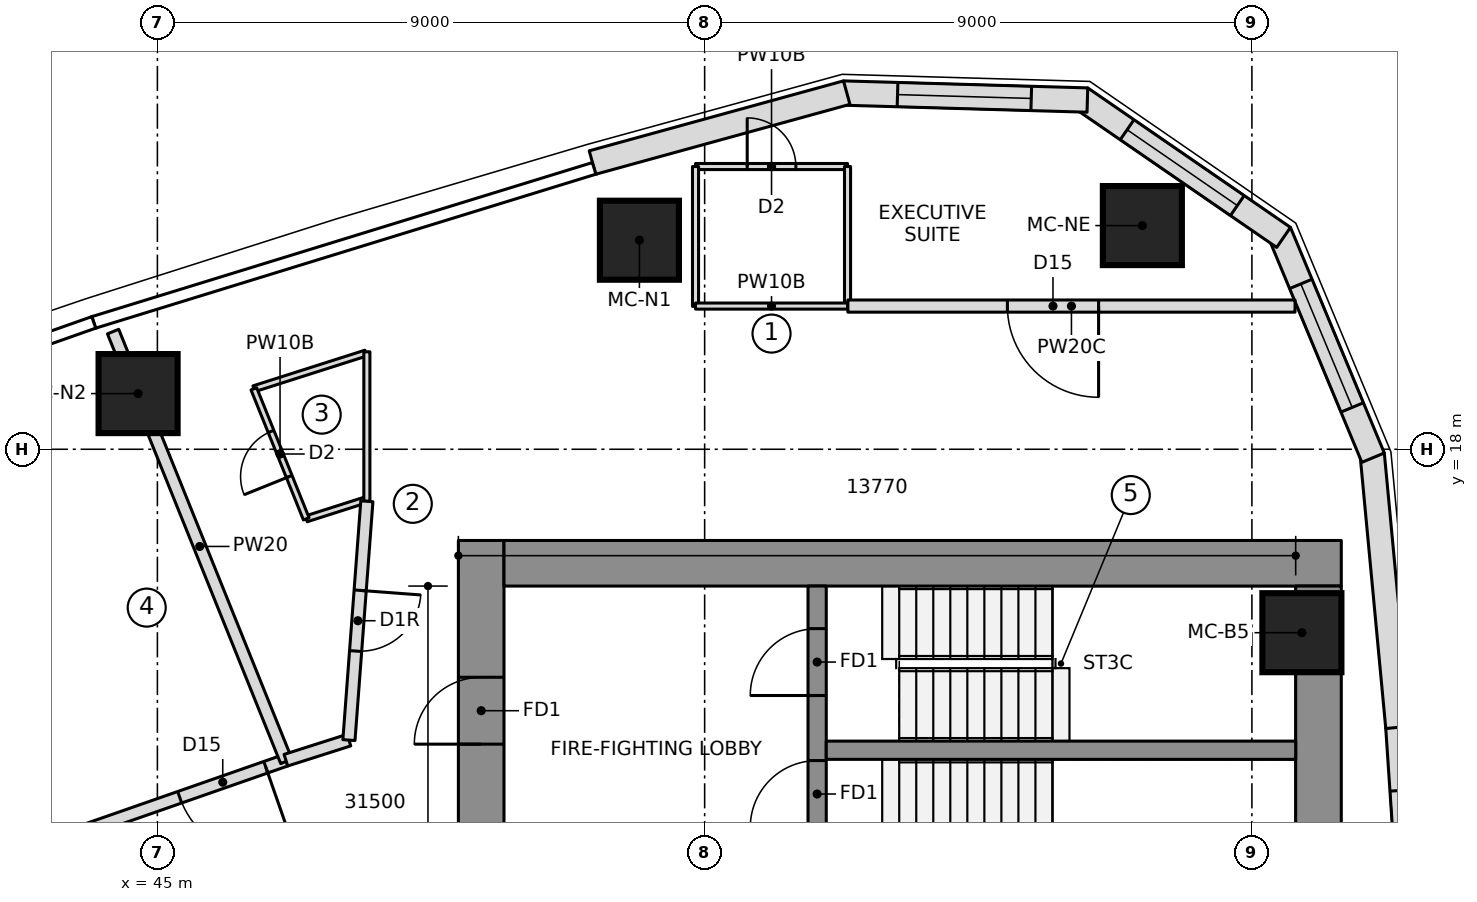
"""IFC4 building model, lengths in metres.
Left out: names, types, materials, properties, quantities, classifications, styles, units other than length and angle.
Written with IfcOpenShell. Run it as: python <this file> out.ifc"""

import sys

from ifc_helpers import new_model, si_unit, direction, frame, frame_2d, origin, origin_2d, place, context, subcontext, project, spatial, polyline, rectangle, outline, extrude, element, fill, save


model = new_model("IFC4")
c1 = context("Model", 3, precision=1e-05, world=origin(), true_north=direction((0.0, 1.0)))
c2 = subcontext(c1, "Body", "Model", "MODEL_VIEW")
j1 = project(units=[si_unit("LENGTHUNIT", "METRE"), si_unit("PLANEANGLEUNIT", "RADIAN")], contexts=[c1])
p1 = place(None, origin())
s1 = spatial("IfcSite", under=j1, at=p1, CompositionType="ELEMENT")
p2 = place(p1, origin())
s2 = spatial("IfcBuilding", under=s1, at=p2, CompositionType="ELEMENT")
p3 = place(p2, frame((0.0, 0.0, 200.35)))
s3 = spatial("IfcBuildingStorey", under=s2, at=p3, CompositionType="ELEMENT", Elevation=200.35)
p4 = place(p3, frame((50.325, 6.65, 0.0), z_axis=(0.0, 0.0, 1.0), x_axis=(0.0, 1.0, 0.0)))
e1 = element("IfcWall", 1, at=p4, inside=s3, PredefinedType="SHEAR", context=c2, shape_type="SweptSolid", body=[
    extrude(rectangle(XDim=9.85, YDim=0.75, at=frame_2d((4.925, 0.0))), origin(), (0.0, 0.0, 1.0), 3.55),
])
p5 = place(p4, frame((6.5, 0.0, 0.0)))
e2 = element("IfcOpeningElement", 2, at=p5, cuts=e1, PredefinedType="OPENING", context=c2, shape_type="SweptSolid", body=[
    extrude(rectangle(XDim=1.1, YDim=2.1, at=frame_2d((0.55, 1.05))), frame((0.0, 0.385, 0.0), z_axis=(0.0, -1.0, 0.0), x_axis=(1.0, 0.0, 0.0)), (0.0, 0.0, 1.0), 0.77),
])
p6 = place(p3, frame((50.7, 16.125, 0.0), z_axis=(0.0, 0.0, 1.0), x_axis=(1.0, 0.0, 0.0)))
e3 = element("IfcWall", 3, at=p6, inside=s3, PredefinedType="SHEAR", context=c2, shape_type="SweptSolid", body=[
    extrude(rectangle(XDim=13.77, YDim=0.75, at=frame_2d((6.885, 0.0))), origin(), (0.0, 0.0, 1.0), 3.55),
])
p7 = place(p3, frame((64.095, 8.099, 0.0), z_axis=(0.0, 0.0, 1.0), x_axis=(0.0, 1.0, 0.0)))
e4 = element("IfcWall", 4, at=p7, inside=s3, PredefinedType="SHEAR", context=c2, shape_type="SweptSolid", body=[
    extrude(rectangle(XDim=7.651, YDim=0.75, at=frame_2d((3.825, 0.0))), origin(), (0.0, 0.0, 1.0), 3.55),
])
p8 = place(p3, frame((55.85, 10.35, 0.0), z_axis=(0.0, 0.0, 1.0), x_axis=(0.0, 1.0, 0.0)))
e5 = element("IfcWall", 5, at=p8, inside=s3, PredefinedType="SHEAR", context=c2, shape_type="SweptSolid", body=[
    extrude(rectangle(XDim=5.4, YDim=0.3, at=frame_2d((2.7, 0.0))), origin(), (0.0, 0.0, 1.0), 3.55),
])
p9 = place(p8, frame((1.43, 0.0, 0.0)))
e6 = element("IfcOpeningElement", 6, at=p9, cuts=e5, PredefinedType="OPENING", context=c2, shape_type="SweptSolid", body=[
    extrude(rectangle(XDim=1.1, YDim=2.1, at=frame_2d((0.55, 1.05))), frame((0.0, 0.16, 0.0), z_axis=(0.0, -1.0, 0.0), x_axis=(1.0, 0.0, 0.0)), (0.0, 0.0, 1.0), 0.32),
])
p10 = place(p8, frame((3.6, 0.0, 0.0)))
e7 = element("IfcOpeningElement", 7, at=p10, cuts=e5, PredefinedType="OPENING", context=c2, shape_type="SweptSolid", body=[
    extrude(rectangle(XDim=1.1, YDim=2.1, at=frame_2d((0.55, 1.05))), frame((0.0, 0.16, 0.0), z_axis=(0.0, -1.0, 0.0), x_axis=(1.0, 0.0, 0.0)), (0.0, 0.0, 1.0), 0.32),
])
p11 = place(p3, frame((56.0, 13.05, 0.0), z_axis=(0.0, 0.0, 1.0), x_axis=(1.0, 0.0, 0.0)))
e8 = element("IfcWall", 8, at=p11, inside=s3, PredefinedType="SHEAR", context=c2, shape_type="SweptSolid", body=[
    extrude(rectangle(XDim=7.72, YDim=0.3, at=frame_2d((3.86, 0.0))), origin(), (0.0, 0.0, 1.0), 3.55),
])
for number, where, z_axis, x_axis in (
    (9, (63.822, 14.983, 0.0), (0.0, 0.0, 1.0), (1.0, 0.0, 0.0)),
    (10, (61.198, 21.679, 0.0), (0.0, 0.0, 1.0), (1.0, 0.0, 0.0)),
    (11, (52.927, 21.438, 0.0), (0.0, 0.0, 1.0), (1.0, 0.0, 0.0)),
    (12, (44.683, 18.916, 0.0), (0.0, 0.0, 1.0), (1.0, 0.0, 0.0)),
):
    element("IfcColumn", number, at=place(p3, frame(where, z_axis=z_axis, x_axis=x_axis)), inside=s3, PredefinedType="COLUMN", context=c2, shape_type="SweptSolid", body=[
        extrude(rectangle(XDim=1.3, YDim=1.3, at=origin_2d()), origin(), (0.0, 0.0, 1.0), 3.55),
    ])
p12 = place(p3, frame((65.7, 8.958, 0.0), z_axis=(0.0, 0.0, 1.0), x_axis=(-0.066905935948, 0.997759287471, 0.0)))
e13 = element("IfcWall", 13, at=p12, inside=s3, PredefinedType="NOTDEFINED", context=c2, shape_type="SweptSolid", body=[
    extrude(outline(polyline([(-0.003, -0.2), (4.484, -0.2), (4.478, 0.2), (0.003, 0.2), (-0.003, -0.2)])), origin(), (0.0, 0.0, 1.0), 3.25),
])
p13 = place(p12, frame((1.04, 0.0, 0.5)))
e14 = element("IfcOpeningElement", 14, at=p13, cuts=e13, PredefinedType="OPENING", context=c2, shape_type="SweptSolid", body=[
    extrude(rectangle(XDim=2.4, YDim=2.0, at=frame_2d((1.2, 1.0))), frame((0.0, 0.21, 0.0), z_axis=(0.0, -1.0, 0.0), x_axis=(1.0, 0.0, 0.0)), (0.0, 0.0, 1.0), 0.42),
])
p14 = place(p3, frame((65.401, 13.429, 0.0), z_axis=(0.0, 0.0, 1.0), x_axis=(-0.093605694738, 0.995609348044, 0.0)))
e15 = element("IfcWall", 15, at=p14, inside=s3, PredefinedType="NOTDEFINED", context=c2, shape_type="SweptSolid", body=[
    extrude(outline(polyline([(-0.003, -0.2), (4.511, -0.2), (4.451, 0.2), (0.003, 0.2), (-0.003, -0.2)])), origin(), (0.0, 0.0, 1.0), 3.25),
])
p15 = place(p3, frame((64.981, 17.89, 0.0), z_axis=(0.0, 0.0, 1.0), x_axis=(-0.383997619794, 0.923334082547, 0.0)))
e16 = element("IfcWall", 16, at=p15, inside=s3, PredefinedType="NOTDEFINED", context=c2, shape_type="SweptSolid", body=[
    extrude(outline(polyline([(-0.03, -0.2), (3.988, -0.2), (3.87, 0.2), (0.03, 0.2), (-0.03, -0.2)])), origin(), (0.0, 0.0, 1.0), 3.25),
])
p16 = place(p15, frame((0.865, 0.0, 0.6)))
e17 = element("IfcOpeningElement", 17, at=p16, cuts=e16, PredefinedType="OPENING", context=c2, shape_type="SweptSolid", body=[
    extrude(outline(polyline([(0.0, 1.35), (0.084, 1.771), (0.322, 2.128), (0.679, 2.366), (1.1, 2.45), (1.521, 2.366), (1.878, 2.128), (2.116, 1.771), (2.2, 1.35), (2.2, 1.1), (2.116, 0.679), (1.878, 0.322), (1.521, 0.084), (1.1, 0.0), (0.679, 0.084), (0.322, 0.322), (0.084, 0.679), (0.0, 1.1), (0.0, 1.35)])), frame((0.0, 0.21, 0.0), z_axis=(0.0, -1.0, 0.0), x_axis=(1.0, 0.0, 0.0)), (0.0, 0.0, 1.0), 0.42),
])
p17 = place(p3, frame((63.472, 21.518, 0.0), z_axis=(0.0, 0.0, 1.0), x_axis=(-0.823806162588, 0.566871596115, 0.0)))
e18 = element("IfcWall", 18, at=p17, inside=s3, PredefinedType="NOTDEFINED", context=c2, shape_type="SweptSolid", body=[
    extrude(outline(polyline([(-0.059, -0.2), (3.988, -0.2), (3.87, 0.2), (0.059, 0.2), (-0.059, -0.2)])), origin(), (0.0, 0.0, 1.0), 3.25),
])
p18 = place(p17, frame((0.865, 0.0, 0.6)))
e19 = element("IfcOpeningElement", 19, at=p18, cuts=e18, PredefinedType="OPENING", context=c2, shape_type="SweptSolid", body=[
    extrude(outline(polyline([(0.0, 1.35), (0.084, 1.771), (0.322, 2.128), (0.679, 2.366), (1.1, 2.45), (1.521, 2.366), (1.878, 2.128), (2.116, 1.771), (2.2, 1.35), (2.2, 1.1), (2.116, 0.679), (1.878, 0.322), (1.521, 0.084), (1.1, 0.0), (0.679, 0.084), (0.322, 0.322), (0.084, 0.679), (0.0, 1.1), (0.0, 1.35)])), frame((0.0, 0.21, 0.0), z_axis=(0.0, -1.0, 0.0), x_axis=(1.0, 0.0, 0.0)), (0.0, 0.0, 1.0), 0.42),
])
p19 = place(p3, frame((60.236, 23.745, 0.0), z_axis=(0.0, 0.0, 1.0), x_axis=(-0.999587920197, 0.028705222472, 0.0)))
e20 = element("IfcWall", 20, at=p19, inside=s3, PredefinedType="NOTDEFINED", context=c2, shape_type="SweptSolid", body=[
    extrude(outline(polyline([(-0.059, -0.2), (3.959, -0.2), (3.9, 0.2), (0.059, 0.2), (-0.059, -0.2)])), origin(), (0.0, 0.0, 1.0), 3.25),
])
p20 = place(p19, frame((0.865, 0.0, 0.6)))
e21 = element("IfcOpeningElement", 21, at=p20, cuts=e20, PredefinedType="OPENING", context=c2, shape_type="SweptSolid", body=[
    extrude(outline(polyline([(0.0, 1.35), (0.084, 1.771), (0.322, 2.128), (0.679, 2.366), (1.1, 2.45), (1.521, 2.366), (1.878, 2.128), (2.116, 1.771), (2.2, 1.35), (2.2, 1.1), (2.116, 0.679), (1.878, 0.322), (1.521, 0.084), (1.1, 0.0), (0.679, 0.084), (0.322, 0.322), (0.084, 0.679), (0.0, 1.1), (0.0, 1.35)])), frame((0.0, 0.21, 0.0), z_axis=(0.0, -1.0, 0.0), x_axis=(1.0, 0.0, 0.0)), (0.0, 0.0, 1.0), 0.42),
])
p21 = place(p3, frame((56.308, 23.858, 0.0), z_axis=(0.0, 0.0, 1.0), x_axis=(-0.964205755089, -0.265155165617, 0.0)))
e22 = element("IfcWall", 22, at=p21, inside=s3, PredefinedType="NOTDEFINED", context=c2, shape_type="SweptSolid", body=[
    extrude(outline(polyline([(-0.03, -0.2), (4.307, -0.2), (4.307, 0.2), (0.03, 0.2), (-0.03, -0.2)])), origin(), (0.0, 0.0, 1.0), 3.25),
])
p22 = place(p3, frame((53.85, 22.65, 0.0), z_axis=(0.0, 0.0, 1.0), x_axis=(1.0, 0.0, 0.0)))
e23 = element("IfcWall", 23, at=p22, inside=s3, PredefinedType="PARTITIONING", context=c2, shape_type="SweptSolid", body=[
    extrude(rectangle(XDim=2.5, YDim=0.1, at=frame_2d((1.25, 0.0))), origin(), (0.0, 0.0, 1.0), 3.25),
])
p23 = place(p22, frame((0.85, 0.0, 0.0)))
e24 = element("IfcOpeningElement", 24, at=p23, cuts=e23, PredefinedType="OPENING", context=c2, shape_type="SweptSolid", body=[
    extrude(rectangle(XDim=0.8, YDim=2.1, at=frame_2d((0.4, 1.05))), frame((0.0, 0.06, 0.0), z_axis=(0.0, -1.0, 0.0), x_axis=(1.0, 0.0, 0.0)), (0.0, 0.0, 1.0), 0.12),
])
for number, where, z_axis, x_axis in (
    (25, (56.35, 22.65, 0.0), (0.0, 0.0, 1.0), (0.0, -1.0, 0.0)),
    (26, (53.85, 20.35, 0.0), (0.0, 0.0, 1.0), (0.0, 1.0, 0.0)),
):
    element("IfcWall", number, at=place(p3, frame(where, z_axis=z_axis, x_axis=x_axis)), inside=s3, PredefinedType="PARTITIONING", context=c2, shape_type="SweptSolid", body=[
        extrude(rectangle(XDim=2.3, YDim=0.1, at=frame_2d((1.15, 0.0))), origin(), (0.0, 0.0, 1.0), 3.25),
    ])
p24 = place(p3, frame((47.113, 12.886, 0.0), z_axis=(0.0, 0.0, 1.0), x_axis=(-0.944155939639, -0.329498955453, 0.0)))
e27 = element("IfcWall", 27, at=p24, inside=s3, PredefinedType="PARTITIONING", context=c2, shape_type="SweptSolid", body=[
    extrude(rectangle(XDim=8.622, YDim=0.2, at=frame_2d((4.311, 0.0))), origin(), (0.0, 0.0, 1.0), 3.25),
])
p25 = place(p24, frame((0.35, 0.0, 0.0)))
e28 = element("IfcOpeningElement", 28, at=p25, cuts=e27, PredefinedType="OPENING", context=c2, shape_type="SweptSolid", body=[
    extrude(rectangle(XDim=1.5, YDim=2.1, at=frame_2d((0.75, 1.05))), frame((0.0, 0.11, 0.0), z_axis=(0.0, -1.0, 0.0), x_axis=(1.0, 0.0, 0.0)), (0.0, 0.0, 1.0), 0.22),
])
p26 = place(p3, frame((47.121, 12.867, 0.0), z_axis=(0.0, 0.0, 1.0), x_axis=(-0.373907892596, 0.92746584188, 0.0)))
e29 = element("IfcWall", 29, at=p26, inside=s3, PredefinedType="PARTITIONING", context=c2, shape_type="SweptSolid", body=[
    extrude(rectangle(XDim=7.621, YDim=0.2, at=frame_2d((3.811, 0.0))), origin(), (0.0, 0.0, 1.0), 3.25),
])
p27 = place(p3, frame((46.586, 18.994, 0.0), z_axis=(0.0, 0.0, 1.0), x_axis=(0.952696570315, 0.303923090451, 0.0)))
e30 = element("IfcWall", 30, at=p27, inside=s3, PredefinedType="PARTITIONING", context=c2, shape_type="SweptSolid", body=[
    extrude(rectangle(XDim=1.933, YDim=0.1, at=frame_2d((0.966, 0.0))), origin(), (0.0, 0.0, 1.0), 3.25),
])
p28 = place(p3, frame((48.427, 17.167, 0.0), z_axis=(0.0, 0.0, 1.0), x_axis=(-0.952763220029, -0.303714086864, 0.0)))
e31 = element("IfcWall", 31, at=p28, inside=s3, PredefinedType="PARTITIONING", context=c2, shape_type="SweptSolid", body=[
    extrude(rectangle(XDim=1.027, YDim=0.1, at=frame_2d((0.513, 0.0))), origin(), (0.0, 0.0, 1.0), 3.25),
])
p29 = place(p3, frame((47.448, 16.855, 0.0), z_axis=(0.0, 0.0, 1.0), x_axis=(-0.373817051068, 0.927502459474, 0.0)))
e32 = element("IfcWall", 32, at=p29, inside=s3, PredefinedType="PARTITIONING", context=c2, shape_type="SweptSolid", body=[
    extrude(rectangle(XDim=2.306, YDim=0.1, at=frame_2d((1.153, 0.0))), origin(), (0.0, 0.0, 1.0), 3.25),
])
p30 = place(p29, frame((0.75, 0.0, 0.0)))
e33 = element("IfcOpeningElement", 33, at=p30, cuts=e32, PredefinedType="OPENING", context=c2, shape_type="SweptSolid", body=[
    extrude(rectangle(XDim=0.8, YDim=2.1, at=frame_2d((0.4, 1.05))), frame((0.0, 0.06, 0.0), z_axis=(0.0, -1.0, 0.0), x_axis=(1.0, 0.0, 0.0)), (0.0, 0.0, 1.0), 0.12),
])
p31 = place(p3, frame((63.709, 20.355, 0.0), z_axis=(0.0, 0.0, 1.0), x_axis=(-1.0, 0.0, 0.0)))
e34 = element("IfcWall", 34, at=p31, inside=s3, PredefinedType="PARTITIONING", context=c2, shape_type="SweptSolid", body=[
    extrude(rectangle(XDim=7.354, YDim=0.2, at=frame_2d((3.677, 0.0))), origin(), (0.0, 0.0, 1.0), 3.25),
])
p32 = place(p31, frame((3.231, 0.0, 0.0)))
e35 = element("IfcOpeningElement", 35, at=p32, cuts=e34, PredefinedType="OPENING", context=c2, shape_type="SweptSolid", body=[
    extrude(rectangle(XDim=1.5, YDim=2.1, at=frame_2d((0.75, 1.05))), frame((0.0, 0.11, 0.0), z_axis=(0.0, -1.0, 0.0), x_axis=(1.0, 0.0, 0.0)), (0.0, 0.0, 1.0), 0.22),
])
p33 = place(p3, frame((56.35, 20.355, 0.0), z_axis=(0.0, 0.0, 1.0), x_axis=(-1.0, 0.0, 0.0)))
e36 = element("IfcWall", 36, at=p33, inside=s3, PredefinedType="PARTITIONING", context=c2, shape_type="SweptSolid", body=[
    extrude(rectangle(XDim=2.5, YDim=0.1, at=frame_2d((1.25, 0.0))), origin(), (0.0, 0.0, 1.0), 3.25),
])
p34 = place(p3, frame((48.445, 19.603, 0.0), z_axis=(0.0, 0.0, 1.0), x_axis=(0.0, -1.0, 0.0)))
e37 = element("IfcWall", 37, at=p34, inside=s3, PredefinedType="PARTITIONING", context=c2, shape_type="SweptSolid", body=[
    extrude(rectangle(XDim=2.459, YDim=0.1, at=frame_2d((1.229, 0.0))), origin(), (0.0, 0.0, 1.0), 3.25),
])
p35 = place(p3, frame((48.15, 13.217, 0.0), z_axis=(0.0, 0.0, 1.0), x_axis=(-0.952731090451, -0.303814860215, 0.0)))
e38 = element("IfcWall", 38, at=p35, inside=s3, PredefinedType="PARTITIONING", context=c2, shape_type="SweptSolid", body=[
    extrude(rectangle(XDim=1.088, YDim=0.2, at=frame_2d((0.544, 0.0))), origin(), (0.0, 0.0, 1.0), 3.25),
])
p36 = place(p3, frame((48.445, 17.145, 0.0), z_axis=(0.0, 0.0, 1.0), x_axis=(-0.074933243819, -0.997188552366, 0.0)))
e39 = element("IfcWall", 39, at=p36, inside=s3, PredefinedType="PARTITIONING", context=c2, shape_type="SweptSolid", body=[
    extrude(rectangle(XDim=3.939, YDim=0.2, at=frame_2d((1.969, 0.0))), origin(), (0.0, 0.0, 1.0), 3.25),
])
p37 = place(p36, frame((1.47, 0.0, 0.0)))
e40 = element("IfcOpeningElement", 40, at=p37, cuts=e39, PredefinedType="OPENING", context=c2, shape_type="SweptSolid", body=[
    extrude(rectangle(XDim=1.0, YDim=2.1, at=frame_2d((0.5, 1.05))), frame((0.0, 0.11, 0.0), z_axis=(0.0, -1.0, 0.0), x_axis=(1.0, 0.0, 0.0)), (0.0, 0.0, 1.0), 0.22),
])
p38 = place(p13, origin())
e41 = element("IfcWindow", 41, at=p38, inside=s3, PartitioningType="SINGLE_PANEL", PredefinedType="WINDOW", context=c2, shape_type="SweptSolid", body=[
    extrude(rectangle(XDim=2.4, YDim=2.0, at=frame_2d((1.2, 1.0))), frame((0.0, 0.17, 0.0), z_axis=(0.0, -1.0, 0.0), x_axis=(1.0, 0.0, 0.0)), (0.0, 0.0, 1.0), 0.06),
])
fill(e14, e41)
p39 = place(p16, origin())
e42 = element("IfcWindow", 42, at=p39, inside=s3, PartitioningType="SINGLE_PANEL", PredefinedType="WINDOW", context=c2, shape_type="SweptSolid", body=[
    extrude(outline(polyline([(0.0, 1.35), (0.084, 1.771), (0.322, 2.128), (0.679, 2.366), (1.1, 2.45), (1.521, 2.366), (1.878, 2.128), (2.116, 1.771), (2.2, 1.35), (2.2, 1.1), (2.116, 0.679), (1.878, 0.322), (1.521, 0.084), (1.1, 0.0), (0.679, 0.084), (0.322, 0.322), (0.084, 0.679), (0.0, 1.1), (0.0, 1.35)])), frame((0.0, 0.17, 0.0), z_axis=(0.0, -1.0, 0.0), x_axis=(1.0, 0.0, 0.0)), (0.0, 0.0, 1.0), 0.06),
])
fill(e17, e42)
p40 = place(p18, origin())
e43 = element("IfcWindow", 43, at=p40, inside=s3, PartitioningType="SINGLE_PANEL", PredefinedType="WINDOW", context=c2, shape_type="SweptSolid", body=[
    extrude(outline(polyline([(0.0, 1.35), (0.084, 1.771), (0.322, 2.128), (0.679, 2.366), (1.1, 2.45), (1.521, 2.366), (1.878, 2.128), (2.116, 1.771), (2.2, 1.35), (2.2, 1.1), (2.116, 0.679), (1.878, 0.322), (1.521, 0.084), (1.1, 0.0), (0.679, 0.084), (0.322, 0.322), (0.084, 0.679), (0.0, 1.1), (0.0, 1.35)])), frame((0.0, 0.17, 0.0), z_axis=(0.0, -1.0, 0.0), x_axis=(1.0, 0.0, 0.0)), (0.0, 0.0, 1.0), 0.06),
])
fill(e19, e43)
p41 = place(p20, origin())
e44 = element("IfcWindow", 44, at=p41, inside=s3, PartitioningType="SINGLE_PANEL", PredefinedType="WINDOW", context=c2, shape_type="SweptSolid", body=[
    extrude(outline(polyline([(0.0, 1.35), (0.084, 1.771), (0.322, 2.128), (0.679, 2.366), (1.1, 2.45), (1.521, 2.366), (1.878, 2.128), (2.116, 1.771), (2.2, 1.35), (2.2, 1.1), (2.116, 0.679), (1.878, 0.322), (1.521, 0.084), (1.1, 0.0), (0.679, 0.084), (0.322, 0.322), (0.084, 0.679), (0.0, 1.1), (0.0, 1.35)])), frame((0.0, 0.17, 0.0), z_axis=(0.0, -1.0, 0.0), x_axis=(1.0, 0.0, 0.0)), (0.0, 0.0, 1.0), 0.06),
])
fill(e21, e44)
p42 = place(p23, origin())
e45 = element("IfcDoor", 45, at=p42, inside=s3, OperationType="SINGLE_SWING_LEFT", PredefinedType="DOOR", context=c2, shape_type="SweptSolid", body=[
    extrude(rectangle(XDim=0.8, YDim=2.1, at=frame_2d((0.4, 1.05))), frame((0.0, 0.025, 0.0), z_axis=(0.0, -1.0, 0.0), x_axis=(1.0, 0.0, 0.0)), (0.0, 0.0, 1.0), 0.05),
])
fill(e24, e45)
p43 = place(p25, origin())
e46 = element("IfcDoor", 46, at=p43, inside=s3, OperationType="DOUBLE_DOOR_SINGLE_SWING", PredefinedType="DOOR", context=c2, shape_type="SweptSolid", body=[
    extrude(rectangle(XDim=1.5, YDim=2.1, at=frame_2d((0.75, 1.05))), frame((0.0, 0.025, 0.0), z_axis=(0.0, -1.0, 0.0), x_axis=(1.0, 0.0, 0.0)), (0.0, 0.0, 1.0), 0.05),
])
fill(e28, e46)
p44 = place(p30, origin())
e47 = element("IfcDoor", 47, at=p44, inside=s3, OperationType="SINGLE_SWING_LEFT", PredefinedType="DOOR", context=c2, shape_type="SweptSolid", body=[
    extrude(rectangle(XDim=0.8, YDim=2.1, at=frame_2d((0.4, 1.05))), frame((0.0, 0.025, 0.0), z_axis=(0.0, -1.0, 0.0), x_axis=(1.0, 0.0, 0.0)), (0.0, 0.0, 1.0), 0.05),
])
fill(e33, e47)
p45 = place(p32, origin())
e48 = element("IfcDoor", 48, at=p45, inside=s3, OperationType="DOUBLE_DOOR_SINGLE_SWING", PredefinedType="DOOR", context=c2, shape_type="SweptSolid", body=[
    extrude(rectangle(XDim=1.5, YDim=2.1, at=frame_2d((0.75, 1.05))), frame((0.0, 0.025, 0.0), z_axis=(0.0, -1.0, 0.0), x_axis=(1.0, 0.0, 0.0)), (0.0, 0.0, 1.0), 0.05),
])
fill(e35, e48)
p46 = place(p37, origin())
e49 = element("IfcDoor", 49, at=p46, inside=s3, OperationType="SINGLE_SWING_RIGHT", PredefinedType="DOOR", context=c2, shape_type="SweptSolid", body=[
    extrude(rectangle(XDim=1.0, YDim=2.1, at=frame_2d((0.5, 1.05))), frame((0.0, 0.025, 0.0), z_axis=(0.0, -1.0, 0.0), x_axis=(1.0, 0.0, 0.0)), (0.0, 0.0, 1.0), 0.05),
])
fill(e40, e49)
p47 = place(p9, origin())
e50 = element("IfcDoor", 50, at=p47, inside=s3, OperationType="SINGLE_SWING_RIGHT", PredefinedType="DOOR", context=c2, shape_type="SweptSolid", body=[
    extrude(rectangle(XDim=1.1, YDim=2.1, at=frame_2d((0.55, 1.05))), frame((0.0, 0.025, 0.0), z_axis=(0.0, -1.0, 0.0), x_axis=(1.0, 0.0, 0.0)), (0.0, 0.0, 1.0), 0.05),
])
fill(e6, e50)
p48 = place(p10, origin())
e51 = element("IfcDoor", 51, at=p48, inside=s3, OperationType="SINGLE_SWING_RIGHT", PredefinedType="DOOR", context=c2, shape_type="SweptSolid", body=[
    extrude(rectangle(XDim=1.1, YDim=2.1, at=frame_2d((0.55, 1.05))), frame((0.0, 0.025, 0.0), z_axis=(0.0, -1.0, 0.0), x_axis=(1.0, 0.0, 0.0)), (0.0, 0.0, 1.0), 0.05),
])
fill(e7, e51)
p49 = place(p5, origin())
e52 = element("IfcDoor", 52, at=p49, inside=s3, OperationType="SINGLE_SWING_RIGHT", PredefinedType="DOOR", context=c2, shape_type="SweptSolid", body=[
    extrude(rectangle(XDim=1.1, YDim=2.1, at=frame_2d((0.55, 1.05))), frame((0.0, 0.025, 0.0), z_axis=(0.0, -1.0, 0.0), x_axis=(1.0, 0.0, 0.0)), (0.0, 0.0, 1.0), 0.05),
])
fill(e2, e52)
save(model, sys.argv[1])
